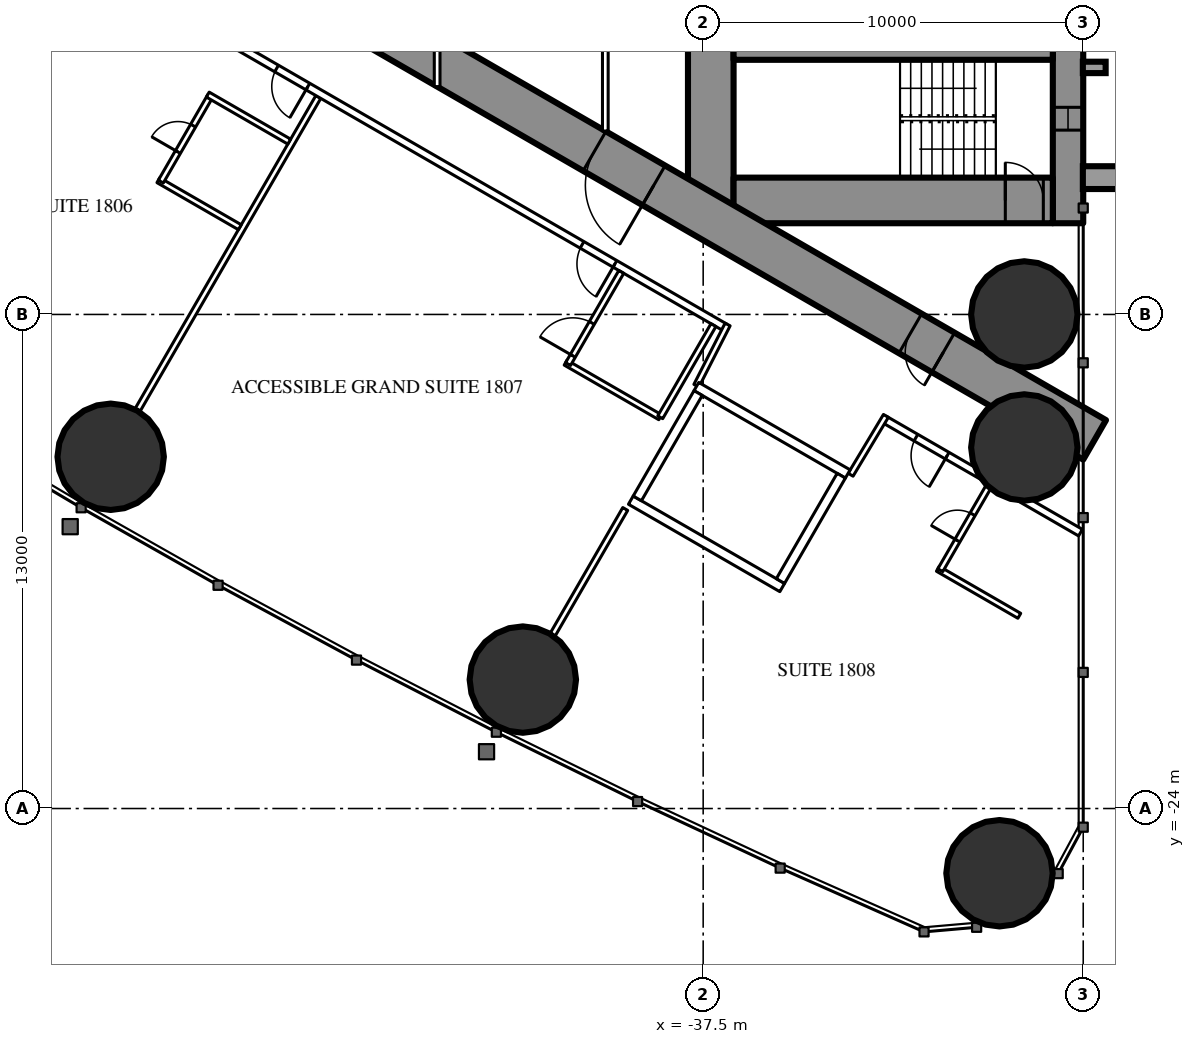
"""IFC4 building model, lengths in metres.
Left out: names, types, materials, properties, quantities, classifications, styles, units other than length and angle.
Written with IfcOpenShell. Run it as: python <this file> out.ifc"""

import sys

from ifc_helpers import new_model, si_unit, direction, frame, frame_2d, origin, origin_2d, place, context, subcontext, project, spatial, rectangle, hollow_circle, extrude, element, fill, save


model = new_model("IFC4")
c1 = context("Model", 3, precision=1e-05, world=origin(), true_north=direction((0.0, 1.0)))
c2 = subcontext(c1, "Body", "Model", "MODEL_VIEW")
j1 = project(units=[si_unit("LENGTHUNIT", "METRE"), si_unit("PLANEANGLEUNIT", "RADIAN")], contexts=[c1])
p1 = place(None, origin())
s1 = spatial("IfcSite", under=j1, at=p1, CompositionType="ELEMENT")
p2 = place(p1, origin())
s2 = spatial("IfcBuilding", under=s1, at=p2, CompositionType="ELEMENT")
p3 = place(p2, frame((0.0, 0.0, 70.5)))
s3 = spatial("IfcBuildingStorey", under=s2, at=p3, CompositionType="ELEMENT", Elevation=70.5)
for number, where, z_axis, x_axis in (
    (1, (-29.703, -25.703, 0.0), (0.0, 0.0, 1.0), (1.0, 0.0, 0.0)),
    (2, (-29.05, -11.0, 0.0), (0.0, 0.0, 1.0), (1.0, 0.0, 0.0)),
    (3, (-29.05, -14.5, 0.0), (0.0, 0.0, 1.0), (1.0, 0.0, 0.0)),
    (4, (-53.09, -14.745, 0.0), (0.0, 0.0, 1.0), (1.0, 0.0, 0.0)),
    (5, (-42.245, -20.607, 0.0), (0.0, 0.0, 1.0), (1.0, 0.0, 0.0)),
):
    element("IfcColumn", number, at=place(p3, frame(where, z_axis=z_axis, x_axis=x_axis)), inside=s3, PredefinedType="COLUMN", context=c2, shape_type="SweptSolid", body=[
        extrude(hollow_circle(Radius=1.4, WallThickness=0.12, at=origin_2d()), origin(), (0.0, 0.0, 1.0), 3.5),
    ])
p4 = place(p3, frame((-27.9, 8.6, 0.0), z_axis=(0.0, 0.0, 1.0), x_axis=(0.0, -1.0, 0.0)))
e6 = element("IfcWall", 6, at=p4, inside=s3, PredefinedType="SHEAR", context=c2, shape_type="SweptSolid", body=[
    extrude(rectangle(XDim=17.2, YDim=0.8, at=frame_2d((8.6, 0.0))), origin(), (0.0, 0.0, 1.0), 3.5),
])
p5 = place(p4, frame((2.45, 0.0, 0.6)))
e7 = element("IfcOpeningElement", 7, at=p5, cuts=e6, PredefinedType="OPENING", context=c2, shape_type="SweptSolid", body=[
    extrude(rectangle(XDim=0.6, YDim=2.1, at=frame_2d((0.3, 1.05))), frame((0.0, 0.41, 0.0), z_axis=(0.0, -1.0, 0.0), x_axis=(1.0, 0.0, 0.0)), (0.0, 0.0, 1.0), 0.82),
])
p6 = place(p4, frame((14.15, 0.0, 0.6)))
e8 = element("IfcOpeningElement", 8, at=p6, cuts=e6, PredefinedType="OPENING", context=c2, shape_type="SweptSolid", body=[
    extrude(rectangle(XDim=0.6, YDim=2.1, at=frame_2d((0.3, 1.05))), frame((0.0, 0.41, 0.0), z_axis=(0.0, -1.0, 0.0), x_axis=(1.0, 0.0, 0.0)), (0.0, 0.0, 1.0), 0.82),
])
p7 = place(p3, frame((-37.3, 8.6, 0.0), z_axis=(0.0, 0.0, 1.0), x_axis=(0.0, -1.0, 0.0)))
e9 = element("IfcWall", 9, at=p7, inside=s3, PredefinedType="SHEAR", context=c2, shape_type="SweptSolid", body=[
    extrude(rectangle(XDim=17.2, YDim=1.2, at=frame_2d((8.6, 0.0))), origin(), (0.0, 0.0, 1.0), 3.5),
])
p8 = place(p7, frame((7.7, 0.0, 0.0)))
e10 = element("IfcOpeningElement", 10, at=p8, cuts=e9, PredefinedType="OPENING", context=c2, shape_type="SweptSolid", body=[
    extrude(rectangle(XDim=1.8, YDim=2.2, at=frame_2d((0.9, 1.1))), frame((0.0, 0.61, 0.0), z_axis=(0.0, -1.0, 0.0), x_axis=(1.0, 0.0, 0.0)), (0.0, 0.0, 1.0), 1.22),
])
p9 = place(p3, frame((-28.3, -8.0, 0.0), z_axis=(0.0, 0.0, 1.0), x_axis=(-1.0, 0.0, 0.0)))
e11 = element("IfcWall", 11, at=p9, inside=s3, PredefinedType="SHEAR", context=c2, shape_type="SweptSolid", body=[
    extrude(rectangle(XDim=8.4, YDim=1.2, at=frame_2d((4.2, 0.0))), origin(), (0.0, 0.0, 1.0), 3.5),
])
p10 = place(p9, frame((0.25, 0.0, 0.0)))
e12 = element("IfcOpeningElement", 12, at=p10, cuts=e11, PredefinedType="OPENING", context=c2, shape_type="SweptSolid", body=[
    extrude(rectangle(XDim=1.0, YDim=2.2, at=frame_2d((0.5, 1.1))), frame((0.0, 0.61, 0.0), z_axis=(0.0, -1.0, 0.0), x_axis=(1.0, 0.0, 0.0)), (0.0, 0.0, 1.0), 1.22),
])
p11 = place(p3, frame((-28.3, -4.15, 0.0), z_axis=(0.0, 0.0, 1.0), x_axis=(-1.0, 0.0, 0.0)))
e13 = element("IfcWall", 13, at=p11, inside=s3, PredefinedType="SHEAR", context=c2, shape_type="SweptSolid", body=[
    extrude(rectangle(XDim=8.4, YDim=0.3, at=frame_2d((4.2, 0.0))), origin(), (0.0, 0.0, 1.0), 3.5),
])
p12 = place(p3, frame((-27.2, -14.3, 0.0), z_axis=(0.0, 0.0, 1.0), x_axis=(-0.866024021859, 0.500002393557, 0.0)))
e14 = element("IfcWall", 14, at=p12, inside=s3, PredefinedType="SHEAR", context=c2, shape_type="SweptSolid", body=[
    extrude(rectangle(XDim=27.907, YDim=1.2, at=frame_2d((13.954, 0.0))), origin(), (0.0, 0.0, 1.0), 3.5),
])
p13 = place(p12, frame((4.6, 0.0, 0.0)))
e15 = element("IfcOpeningElement", 15, at=p13, cuts=e14, PredefinedType="OPENING", context=c2, shape_type="SweptSolid", body=[
    extrude(rectangle(XDim=1.0, YDim=2.2, at=frame_2d((0.5, 1.1))), frame((0.0, 0.61, 0.0), z_axis=(0.0, -1.0, 0.0), x_axis=(1.0, 0.0, 0.0)), (0.0, 0.0, 1.0), 1.22),
])
p14 = place(p12, frame((13.395, 0.0, 0.0)))
e16 = element("IfcOpeningElement", 16, at=p14, cuts=e14, PredefinedType="OPENING", context=c2, shape_type="SweptSolid", body=[
    extrude(rectangle(XDim=1.8, YDim=2.2, at=frame_2d((0.9, 1.1))), frame((0.0, 0.61, 0.0), z_axis=(0.0, -1.0, 0.0), x_axis=(1.0, 0.0, 0.0)), (0.0, 0.0, 1.0), 1.22),
])
p15 = place(p3, frame((-47.627, -5.278, 0.0), z_axis=(0.0, 0.0, 1.0), x_axis=(-0.500009844318, -0.86601972009, 0.0)))
e17 = element("IfcWall", 17, at=p15, inside=s3, PredefinedType="PARTITIONING", context=c2, shape_type="SweptSolid", body=[
    extrude(rectangle(XDim=9.51, YDim=0.15, at=frame_2d((4.755, 0.0))), origin(), (0.0, 0.0, 1.0), 2.25),
])
p16 = place(p3, frame((-39.551, -16.118, 0.0), z_axis=(0.0, 0.0, 1.0), x_axis=(-0.499986503906, -0.866033195618, 0.0)))
e18 = element("IfcWall", 18, at=p16, inside=s3, PredefinedType="PARTITIONING", context=c2, shape_type="SweptSolid", body=[
    extrude(rectangle(XDim=3.815, YDim=0.15, at=frame_2d((1.907, 0.0))), origin(), (0.0, 0.0, 1.0), 3.25),
])
p17 = place(p3, frame((-27.572, -16.741, 0.0), z_axis=(0.0, 0.0, 1.0), x_axis=(-0.866024464444, 0.500001626982, 0.0)))
e19 = element("IfcWall", 19, at=p17, inside=s3, PredefinedType="PARTITIONING", context=c2, shape_type="SweptSolid", body=[
    extrude(rectangle(XDim=5.955, YDim=0.2, at=frame_2d((2.978, 0.0))), origin(), (0.0, 0.0, 1.0), 3.25),
])
p18 = place(p17, frame((4.05, 0.0, 0.0)))
e20 = element("IfcOpeningElement", 20, at=p18, cuts=e19, PredefinedType="OPENING", context=c2, shape_type="SweptSolid", body=[
    extrude(rectangle(XDim=0.95, YDim=2.2, at=frame_2d((0.475, 1.1))), frame((0.0, 0.11, 0.0), z_axis=(0.0, -1.0, 0.0), x_axis=(1.0, 0.0, 0.0)), (0.0, 0.0, 1.0), 0.22),
])
p19 = place(p3, frame((-36.92, -11.344, 0.0), z_axis=(0.0, 0.0, 1.0), x_axis=(-0.866028313256, 0.499994960614, 0.0)))
e21 = element("IfcWall", 21, at=p19, inside=s3, PredefinedType="PARTITIONING", context=c2, shape_type="SweptSolid", body=[
    extrude(rectangle(XDim=22.568, YDim=0.2, at=frame_2d((11.284, 0.0))), origin(), (0.0, 0.0, 1.0), 3.25),
])
p20 = place(p19, frame((20.958, 0.0, 0.0)))
e22 = element("IfcOpeningElement", 22, at=p20, cuts=e21, PredefinedType="OPENING", context=c2, shape_type="SweptSolid", body=[
    extrude(rectangle(XDim=0.95, YDim=2.2, at=frame_2d((0.475, 1.1))), frame((0.0, 0.11, 0.0), z_axis=(0.0, -1.0, 0.0), x_axis=(1.0, 0.0, 0.0)), (0.0, 0.0, 1.0), 0.22),
])
p21 = place(p19, frame((12.68, 0.0, 0.0)))
e23 = element("IfcOpeningElement", 23, at=p21, cuts=e21, PredefinedType="OPENING", context=c2, shape_type="SweptSolid", body=[
    extrude(rectangle(XDim=0.95, YDim=2.2, at=frame_2d((0.475, 1.1))), frame((0.0, 0.11, 0.0), z_axis=(0.0, -1.0, 0.0), x_axis=(1.0, 0.0, 0.0)), (0.0, 0.0, 1.0), 0.22),
])
p22 = place(p19, frame((3.35, 0.0, 0.0)))
e24 = element("IfcOpeningElement", 24, at=p22, cuts=e21, PredefinedType="OPENING", context=c2, shape_type="SweptSolid", body=[
    extrude(rectangle(XDim=1.0, YDim=2.2, at=frame_2d((0.5, 1.1))), frame((0.0, 0.11, 0.0), z_axis=(0.0, -1.0, 0.0), x_axis=(1.0, 0.0, 0.0)), (0.0, 0.0, 1.0), 0.22),
])
p23 = place(p3, frame((-36.857, -11.265, 0.0), z_axis=(0.0, 0.0, 1.0), x_axis=(-0.454225294761, -0.890886851176, 0.0)))
e25 = element("IfcWall", 25, at=p23, inside=s3, PredefinedType="PARTITIONING", context=c2, shape_type="SweptSolid", body=[
    extrude(rectangle(XDim=1.807, YDim=0.15, at=frame_2d((0.904, 0.0))), origin(), (0.0, 0.0, 1.0), 3.25),
])
p24 = place(p3, frame((-33.621, -15.218, 0.0), z_axis=(0.0, 0.0, 1.0), x_axis=(0.514336634837, 0.857588377991, 0.0)))
e26 = element("IfcWall", 26, at=p24, inside=s3, PredefinedType="PARTITIONING", context=c2, shape_type="SweptSolid", body=[
    extrude(rectangle(XDim=1.805, YDim=0.15, at=frame_2d((0.903, 0.0))), origin(), (0.0, 0.0, 1.0), 3.25),
])
p25 = place(p3, frame((-49.692, -8.704, 0.0), z_axis=(0.0, 0.0, 1.0), x_axis=(-0.866073894602, 0.499916002032, 0.0)))
e27 = element("IfcWall", 27, at=p25, inside=s3, PredefinedType="PARTITIONING", context=c2, shape_type="SweptSolid", body=[
    extrude(rectangle(XDim=2.475, YDim=0.15, at=frame_2d((1.238, 0.0))), origin(), (0.0, 0.0, 1.0), 3.25),
])
p26 = place(p3, frame((-50.47, -5.253, 0.0), z_axis=(0.0, 0.0, 1.0), x_axis=(-0.500006934395, -0.866021400173, 0.0)))
e28 = element("IfcWall", 28, at=p26, inside=s3, PredefinedType="PARTITIONING", context=c2, shape_type="SweptSolid", body=[
    extrude(rectangle(XDim=2.6, YDim=0.15, at=frame_2d((1.3, 0.0))), origin(), (0.0, 0.0, 1.0), 3.25),
])
p27 = place(p26, frame((0.9, 0.0, 0.0)))
e29 = element("IfcOpeningElement", 29, at=p27, cuts=e28, PredefinedType="OPENING", context=c2, shape_type="SweptSolid", body=[
    extrude(rectangle(XDim=0.8, YDim=2.2, at=frame_2d((0.4, 1.1))), frame((0.0, 0.085, 0.0), z_axis=(0.0, -1.0, 0.0), x_axis=(1.0, 0.0, 0.0)), (0.0, 0.0, 1.0), 0.17),
])
p28 = place(p3, frame((-48.392, -6.453, 0.0), z_axis=(0.0, 0.0, 1.0), x_axis=(-0.86604923931, 0.499958713387, 0.0)))
e30 = element("IfcWall", 30, at=p28, inside=s3, PredefinedType="PARTITIONING", context=c2, shape_type="SweptSolid", body=[
    extrude(rectangle(XDim=2.475, YDim=0.15, at=frame_2d((1.237, 0.0))), origin(), (0.0, 0.0, 1.0), 3.25),
])
p29 = place(p3, frame((-38.63, -13.705, 0.0), z_axis=(0.0, 0.0, 1.0), x_axis=(-0.866018712932, 0.500011588718, 0.0)))
e31 = element("IfcWall", 31, at=p29, inside=s3, PredefinedType="PARTITIONING", context=c2, shape_type="SweptSolid", body=[
    extrude(rectangle(XDim=2.875, YDim=0.15, at=frame_2d((1.438, 0.0))), origin(), (0.0, 0.0, 1.0), 3.25),
])
p30 = place(p3, frame((-39.655, -9.88, 0.0), z_axis=(0.0, 0.0, 1.0), x_axis=(-0.500049511043, -0.865996816683, 0.0)))
e32 = element("IfcWall", 32, at=p30, inside=s3, PredefinedType="PARTITIONING", context=c2, shape_type="SweptSolid", body=[
    extrude(rectangle(XDim=2.8, YDim=0.15, at=frame_2d((1.4, 0.0))), origin(), (0.0, 0.0, 1.0), 3.25),
])
p31 = place(p30, frame((1.55, 0.0, 0.0)))
e33 = element("IfcOpeningElement", 33, at=p31, cuts=e32, PredefinedType="OPENING", context=c2, shape_type="SweptSolid", body=[
    extrude(rectangle(XDim=1.0, YDim=2.2, at=frame_2d((0.5, 1.1))), frame((0.0, 0.085, 0.0), z_axis=(0.0, -1.0, 0.0), x_axis=(1.0, 0.0, 0.0)), (0.0, 0.0, 1.0), 0.17),
])
p32 = place(p3, frame((-37.23, -11.281, 0.0), z_axis=(0.0, 0.0, 1.0), x_axis=(-0.500049511043, -0.865996816683, 0.0)))
e34 = element("IfcWall", 34, at=p32, inside=s3, PredefinedType="PARTITIONING", context=c2, shape_type="SweptSolid", body=[
    extrude(rectangle(XDim=2.8, YDim=0.15, at=frame_2d((1.4, 0.0))), origin(), (0.0, 0.0, 1.0), 3.25),
])
p33 = place(p3, frame((-29.182, -18.929, 0.0), z_axis=(0.0, 0.0, 1.0), x_axis=(-0.866006523861, 0.500032699561, 0.0)))
e35 = element("IfcWall", 35, at=p33, inside=s3, PredefinedType="PARTITIONING", context=c2, shape_type="SweptSolid", body=[
    extrude(rectangle(XDim=2.475, YDim=0.15, at=frame_2d((1.237, 0.0))), origin(), (0.0, 0.0, 1.0), 3.25),
])
p34 = place(p3, frame((-29.96, -15.478, 0.0), z_axis=(0.0, 0.0, 1.0), x_axis=(-0.500006934395, -0.866021400173, 0.0)))
e36 = element("IfcWall", 36, at=p34, inside=s3, PredefinedType="PARTITIONING", context=c2, shape_type="SweptSolid", body=[
    extrude(rectangle(XDim=2.6, YDim=0.15, at=frame_2d((1.3, 0.0))), origin(), (0.0, 0.0, 1.0), 3.25),
])
p35 = place(p34, frame((0.9, 0.0, 0.0)))
e37 = element("IfcOpeningElement", 37, at=p35, cuts=e36, PredefinedType="OPENING", context=c2, shape_type="SweptSolid", body=[
    extrude(rectangle(XDim=0.8, YDim=2.2, at=frame_2d((0.4, 1.1))), frame((0.0, 0.085, 0.0), z_axis=(0.0, -1.0, 0.0), x_axis=(1.0, 0.0, 0.0)), (0.0, 0.0, 1.0), 0.17),
])
p36 = place(p3, frame((-40.075, 1.2, 0.0), z_axis=(0.0, 0.0, 1.0), x_axis=(0.0, -1.0, 0.0)))
e38 = element("IfcWall", 38, at=p36, inside=s3, PredefinedType="PARTITIONING", context=c2, shape_type="SweptSolid", body=[
    extrude(rectangle(XDim=7.374, YDim=0.15, at=frame_2d((3.687, 0.0))), origin(), (0.0, 0.0, 1.0), 3.25),
])
p37 = place(p36, frame((2.787, 0.0, 0.0)))
e39 = element("IfcOpeningElement", 39, at=p37, cuts=e38, PredefinedType="OPENING", context=c2, shape_type="SweptSolid", body=[
    extrude(rectangle(XDim=1.8, YDim=2.2, at=frame_2d((0.9, 1.1))), frame((0.0, 0.085, 0.0), z_axis=(0.0, -1.0, 0.0), x_axis=(1.0, 0.0, 0.0)), (0.0, 0.0, 1.0), 0.17),
])
p38 = place(p3, frame((-44.5, 5.005, 0.0), z_axis=(0.0, 0.0, 1.0), x_axis=(0.0, -1.0, 0.0)))
e40 = element("IfcWall", 40, at=p38, inside=s3, PredefinedType="PARTITIONING", context=c2, shape_type="SweptSolid", body=[
    extrude(rectangle(XDim=10.009, YDim=0.15, at=frame_2d((5.005, 0.0))), origin(), (0.0, 0.0, 1.0), 2.45),
])
p39 = place(p38, frame((2.002, 0.0, 0.0)))
e41 = element("IfcOpeningElement", 41, at=p39, cuts=e40, PredefinedType="OPENING", context=c2, shape_type="SweptSolid", body=[
    extrude(rectangle(XDim=1.0, YDim=2.2, at=frame_2d((0.5, 1.1))), frame((0.0, 0.085, 0.0), z_axis=(0.0, -1.0, 0.0), x_axis=(1.0, 0.0, 0.0)), (0.0, 0.0, 1.0), 0.17),
])
p40 = place(p38, frame((7.007, 0.0, 0.0)))
e42 = element("IfcOpeningElement", 42, at=p40, cuts=e40, PredefinedType="OPENING", context=c2, shape_type="SweptSolid", body=[
    extrude(rectangle(XDim=1.0, YDim=2.2, at=frame_2d((0.5, 1.1))), frame((0.0, 0.085, 0.0), z_axis=(0.0, -1.0, 0.0), x_axis=(1.0, 0.0, 0.0)), (0.0, 0.0, 1.0), 0.17),
])
p41 = place(p3, frame((-33.696, -15.197, 0.0), z_axis=(0.0, 0.0, 1.0), x_axis=(-0.865976953817, 0.500083908417, 0.0)))
e43 = element("IfcWall", 43, at=p41, inside=s3, PredefinedType="PARTITIONING", context=c2, shape_type="SweptSolid", body=[
    extrude(rectangle(XDim=4.599, YDim=0.25, at=frame_2d((2.3, 0.0))), origin(), (0.0, 0.0, 1.0), 3.25),
])
p42 = place(p3, frame((-35.42, -18.186, 0.0), z_axis=(0.0, 0.0, 1.0), x_axis=(-0.865990227814, 0.50006092162, 0.0)))
e44 = element("IfcWall", 44, at=p42, inside=s3, PredefinedType="PARTITIONING", context=c2, shape_type="SweptSolid", body=[
    extrude(rectangle(XDim=4.6, YDim=0.25, at=frame_2d((2.3, 0.0))), origin(), (0.0, 0.0, 1.0), 3.25),
])
p43 = place(p3, frame((-33.866, -15.243, 0.0), z_axis=(0.0, 0.0, 1.0), x_axis=(-0.499929347863, -0.866066190972, 0.0)))
e45 = element("IfcWall", 45, at=p43, inside=s3, PredefinedType="PARTITIONING", context=c2, shape_type="SweptSolid", body=[
    extrude(rectangle(XDim=3.201, YDim=0.25, at=frame_2d((1.6, 0.0))), origin(), (0.0, 0.0, 1.0), 3.25),
])
p44 = place(p3, frame((-37.633, -13.068, 0.0), z_axis=(0.0, 0.0, 1.0), x_axis=(-0.499872130319, -0.866099216793, 0.0)))
e46 = element("IfcWall", 46, at=p44, inside=s3, PredefinedType="PARTITIONING", context=c2, shape_type="SweptSolid", body=[
    extrude(rectangle(XDim=3.2, YDim=0.25, at=frame_2d((1.6, 0.0))), origin(), (0.0, 0.0, 1.0), 3.25),
])
p45 = place(p27, origin())
e47 = element("IfcDoor", 47, at=p45, inside=s3, OperationType="SINGLE_SWING_RIGHT", PredefinedType="DOOR", context=c2, shape_type="SweptSolid", body=[
    extrude(rectangle(XDim=0.8, YDim=2.2, at=frame_2d((0.4, 1.1))), frame((0.0, 0.025, 0.0), z_axis=(0.0, -1.0, 0.0), x_axis=(1.0, 0.0, 0.0)), (0.0, 0.0, 1.0), 0.05),
])
fill(e29, e47)
p46 = place(p21, origin())
e48 = element("IfcDoor", 48, at=p46, inside=s3, OperationType="SINGLE_SWING_LEFT", PredefinedType="DOOR", context=c2, shape_type="SweptSolid", body=[
    extrude(rectangle(XDim=0.95, YDim=2.2, at=frame_2d((0.475, 1.1))), frame((0.0, 0.025, 0.0), z_axis=(0.0, -1.0, 0.0), x_axis=(1.0, 0.0, 0.0)), (0.0, 0.0, 1.0), 0.05),
])
fill(e23, e48)
p47 = place(p31, origin())
e49 = element("IfcDoor", 49, at=p47, inside=s3, OperationType="SINGLE_SWING_RIGHT", PredefinedType="DOOR", context=c2, shape_type="SweptSolid", body=[
    extrude(rectangle(XDim=1.0, YDim=2.2, at=frame_2d((0.5, 1.1))), frame((0.0, 0.025, 0.0), z_axis=(0.0, -1.0, 0.0), x_axis=(1.0, 0.0, 0.0)), (0.0, 0.0, 1.0), 0.05),
])
fill(e33, e49)
p48 = place(p22, origin())
e50 = element("IfcDoor", 50, at=p48, inside=s3, OperationType="SINGLE_SWING_LEFT", PredefinedType="DOOR", context=c2, shape_type="SweptSolid", body=[
    extrude(rectangle(XDim=1.0, YDim=2.2, at=frame_2d((0.5, 1.1))), frame((0.0, 0.025, 0.0), z_axis=(0.0, -1.0, 0.0), x_axis=(1.0, 0.0, 0.0)), (0.0, 0.0, 1.0), 0.05),
])
fill(e24, e50)
p49 = place(p35, origin())
e51 = element("IfcDoor", 51, at=p49, inside=s3, OperationType="SINGLE_SWING_RIGHT", PredefinedType="DOOR", context=c2, shape_type="SweptSolid", body=[
    extrude(rectangle(XDim=0.8, YDim=2.2, at=frame_2d((0.4, 1.1))), frame((0.0, 0.025, 0.0), z_axis=(0.0, -1.0, 0.0), x_axis=(1.0, 0.0, 0.0)), (0.0, 0.0, 1.0), 0.05),
])
fill(e37, e51)
p50 = place(p18, origin())
e52 = element("IfcDoor", 52, at=p50, inside=s3, OperationType="SINGLE_SWING_LEFT", PredefinedType="DOOR", context=c2, shape_type="SweptSolid", body=[
    extrude(rectangle(XDim=0.95, YDim=2.2, at=frame_2d((0.475, 1.1))), frame((0.0, 0.025, 0.0), z_axis=(0.0, -1.0, 0.0), x_axis=(1.0, 0.0, 0.0)), (0.0, 0.0, 1.0), 0.05),
])
fill(e20, e52)
p51 = place(p13, origin())
e53 = element("IfcDoor", 53, at=p51, inside=s3, OperationType="SINGLE_SWING_LEFT", PredefinedType="DOOR", context=c2, shape_type="SweptSolid", body=[
    extrude(rectangle(XDim=1.0, YDim=2.2, at=frame_2d((0.5, 1.1))), frame((0.0, 0.025, 0.0), z_axis=(0.0, -1.0, 0.0), x_axis=(1.0, 0.0, 0.0)), (0.0, 0.0, 1.0), 0.05),
])
fill(e15, e53)
p52 = place(p14, origin())
e54 = element("IfcDoor", 54, at=p52, inside=s3, OperationType="DOUBLE_DOOR_SINGLE_SWING", PredefinedType="DOOR", context=c2, shape_type="SweptSolid", body=[
    extrude(rectangle(XDim=1.8, YDim=2.2, at=frame_2d((0.9, 1.1))), frame((0.0, 0.025, 0.0), z_axis=(0.0, -1.0, 0.0), x_axis=(1.0, 0.0, 0.0)), (0.0, 0.0, 1.0), 0.05),
])
fill(e16, e54)
p53 = place(p10, origin())
e55 = element("IfcDoor", 55, at=p53, inside=s3, OperationType="SINGLE_SWING_RIGHT", PredefinedType="DOOR", context=c2, shape_type="SweptSolid", body=[
    extrude(rectangle(XDim=1.0, YDim=2.2, at=frame_2d((0.5, 1.1))), frame((0.0, 0.025, 0.0), z_axis=(0.0, -1.0, 0.0), x_axis=(1.0, 0.0, 0.0)), (0.0, 0.0, 1.0), 0.05),
])
fill(e12, e55)
p54 = place(p6, origin())
e56 = element("IfcWindow", 56, at=p54, inside=s3, PartitioningType="SINGLE_PANEL", PredefinedType="WINDOW", context=c2, shape_type="SweptSolid", body=[
    extrude(rectangle(XDim=0.6, YDim=2.1, at=frame_2d((0.3, 1.05))), frame((0.0, 0.03, 0.0), z_axis=(0.0, -1.0, 0.0), x_axis=(1.0, 0.0, 0.0)), (0.0, 0.0, 1.0), 0.06),
])
fill(e8, e56)
save(model, sys.argv[1])
